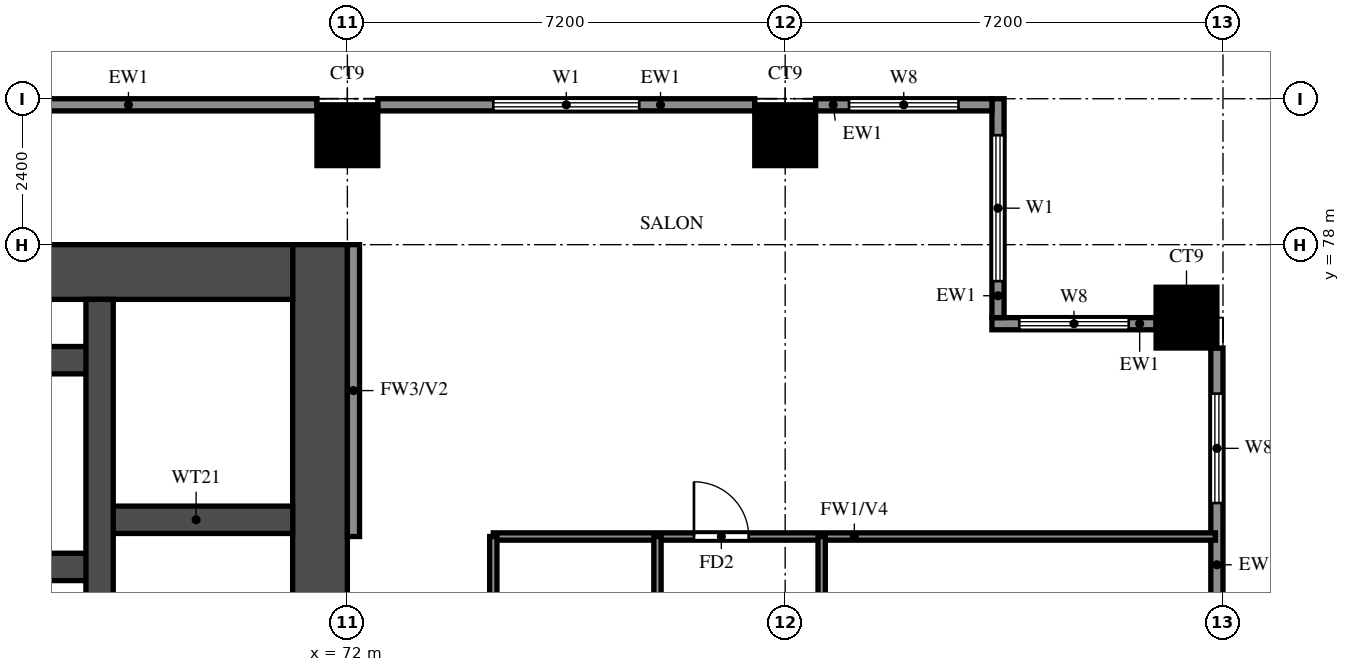
"""IFC4 building model, lengths in metres.
Left out: names, types, materials, properties, quantities, classifications, styles, units other than length and angle.
Written with IfcOpenShell. Run it as: python <this file> out.ifc"""

import sys

from ifc_helpers import new_model, si_unit, direction, frame, frame_2d, origin, origin_2d, place, context, subcontext, project, spatial, rectangle, extrude, source, transform, mapped, element, fill, save


model = new_model("IFC4")
c1 = context("Model", 3, precision=1e-05, world=origin(), true_north=direction((0.0, 1.0)))
c2 = subcontext(c1, "Body", "Model", "MODEL_VIEW")
j1 = project(units=[si_unit("LENGTHUNIT", "METRE"), si_unit("PLANEANGLEUNIT", "RADIAN")], contexts=[c1])
p1 = place(None, origin())
s1 = spatial("IfcSite", under=j1, at=p1, CompositionType="ELEMENT")
p2 = place(p1, origin())
s2 = spatial("IfcBuilding", under=s1, at=p2, CompositionType="ELEMENT")
p3 = place(p2, frame((0.0, 0.0, 83.0)))
s3 = spatial("IfcBuildingStorey", under=s2, at=p3, CompositionType="ELEMENT", Elevation=83.0)
m1 = source(origin(), c2, "Body", "SweptSolid", [
    extrude(rectangle(XDim=1.0, YDim=1.0, at=origin_2d()), origin(), (0.0, 0.0, 1.0), 3.18),
])
for number, where, z_axis, x_axis in (
    (1, (85.8, 76.8, 0.0), (0.0, 0.0, 1.0), (1.0, 0.0, 0.0)),
    (2, (72.0, 79.8, 0.0), (0.0, 0.0, 1.0), (1.0, 0.0, 0.0)),
    (3, (79.2, 79.8, 0.0), (0.0, 0.0, 1.0), (1.0, 0.0, 0.0)),
):
    element("IfcColumn", number, at=place(p3, frame(where, z_axis=z_axis, x_axis=x_axis)), inside=s3, PredefinedType="COLUMN", context=c2, shape_type="MappedRepresentation", body=[
        mapped(m1, transform((0.0, 0.0, 0.0))),
    ])
p4 = place(p3, frame((71.55, 66.0, 0.0), z_axis=(0.0, 0.0, 1.0), x_axis=(0.0, 1.0, 0.0)))
e4 = element("IfcWall", 4, at=p4, inside=s3, PredefinedType="SHEAR", context=c2, shape_type="SweptSolid", body=[
    extrude(rectangle(XDim=12.0, YDim=0.9, at=frame_2d((6.0, 0.0))), origin(), (0.0, 0.0, 1.0), 3.18),
])
p5 = place(p3, frame((29.7, 77.55, 0.0), z_axis=(0.0, 0.0, 1.0), x_axis=(1.0, 0.0, 0.0)))
e5 = element("IfcWall", 5, at=p5, inside=s3, PredefinedType="SHEAR", context=c2, shape_type="SweptSolid", body=[
    extrude(rectangle(XDim=41.4, YDim=0.9, at=frame_2d((20.7, 0.0))), origin(), (0.0, 0.0, 1.0), 3.18),
])
p6 = place(p3, frame((32.875, 72.7, 0.0), z_axis=(0.0, 0.0, 1.0), x_axis=(1.0, 0.0, 0.0)))
e6 = element("IfcWall", 6, at=p6, inside=s3, PredefinedType="SHEAR", context=c2, shape_type="SweptSolid", body=[
    extrude(rectangle(XDim=35.05, YDim=0.45, at=frame_2d((17.525, 0.0))), origin(), (0.0, 0.0, 1.0), 3.18),
])
p7 = place(p6, frame((19.8, 0.0, 0.0)))
e7 = element("IfcOpeningElement", 7, at=p7, cuts=e6, PredefinedType="OPENING", context=c2, shape_type="SweptSolid", body=[
    extrude(rectangle(XDim=1.1, YDim=2.1, at=frame_2d((0.55, 1.05))), frame((0.0, 0.235, 0.0), z_axis=(0.0, -1.0, 0.0), x_axis=(1.0, 0.0, 0.0)), (0.0, 0.0, 1.0), 0.47),
])
p8 = place(p6, frame((27.65, 0.0, 0.0)))
e8 = element("IfcOpeningElement", 8, at=p8, cuts=e6, PredefinedType="OPENING", context=c2, shape_type="SweptSolid", body=[
    extrude(rectangle(XDim=1.1, YDim=2.1, at=frame_2d((0.55, 1.05))), frame((0.0, 0.235, 0.0), z_axis=(0.0, -1.0, 0.0), x_axis=(1.0, 0.0, 0.0)), (0.0, 0.0, 1.0), 0.47),
])
p9 = place(p6, frame((30.25, 0.0, 0.0)))
e9 = element("IfcOpeningElement", 9, at=p9, cuts=e6, PredefinedType="OPENING", context=c2, shape_type="SweptSolid", body=[
    extrude(rectangle(XDim=1.1, YDim=2.1, at=frame_2d((0.55, 1.05))), frame((0.0, 0.235, 0.0), z_axis=(0.0, -1.0, 0.0), x_axis=(1.0, 0.0, 0.0)), (0.0, 0.0, 1.0), 0.47),
])
p10 = place(p6, frame((3.75, 0.0, 0.0)))
e10 = element("IfcOpeningElement", 10, at=p10, cuts=e6, PredefinedType="OPENING", context=c2, shape_type="SweptSolid", body=[
    extrude(rectangle(XDim=1.1, YDim=2.1, at=frame_2d((0.55, 1.05))), frame((0.0, 0.235, 0.0), z_axis=(0.0, -1.0, 0.0), x_axis=(1.0, 0.0, 0.0)), (0.0, 0.0, 1.0), 0.47),
])
p11 = place(p6, frame((6.5, 0.0, 0.0)))
e11 = element("IfcOpeningElement", 11, at=p11, cuts=e6, PredefinedType="OPENING", context=c2, shape_type="SweptSolid", body=[
    extrude(rectangle(XDim=1.1, YDim=2.1, at=frame_2d((0.55, 1.05))), frame((0.0, 0.235, 0.0), z_axis=(0.0, -1.0, 0.0), x_axis=(1.0, 0.0, 0.0)), (0.0, 0.0, 1.0), 0.47),
])
p12 = place(p6, frame((9.25, 0.0, 0.0)))
e12 = element("IfcOpeningElement", 12, at=p12, cuts=e6, PredefinedType="OPENING", context=c2, shape_type="SweptSolid", body=[
    extrude(rectangle(XDim=1.1, YDim=2.1, at=frame_2d((0.55, 1.05))), frame((0.0, 0.235, 0.0), z_axis=(0.0, -1.0, 0.0), x_axis=(1.0, 0.0, 0.0)), (0.0, 0.0, 1.0), 0.47),
])
p13 = place(p6, frame((12.0, 0.0, 0.0)))
e13 = element("IfcOpeningElement", 13, at=p13, cuts=e6, PredefinedType="OPENING", context=c2, shape_type="SweptSolid", body=[
    extrude(rectangle(XDim=1.1, YDim=2.1, at=frame_2d((0.55, 1.05))), frame((0.0, 0.235, 0.0), z_axis=(0.0, -1.0, 0.0), x_axis=(1.0, 0.0, 0.0)), (0.0, 0.0, 1.0), 0.47),
])
p14 = place(p6, frame((14.75, 0.0, 0.0)))
e14 = element("IfcOpeningElement", 14, at=p14, cuts=e6, PredefinedType="OPENING", context=c2, shape_type="SweptSolid", body=[
    extrude(rectangle(XDim=1.1, YDim=2.1, at=frame_2d((0.55, 1.05))), frame((0.0, 0.235, 0.0), z_axis=(0.0, -1.0, 0.0), x_axis=(1.0, 0.0, 0.0)), (0.0, 0.0, 1.0), 0.47),
])
p15 = place(p6, frame((17.5, 0.0, 0.0)))
e15 = element("IfcOpeningElement", 15, at=p15, cuts=e6, PredefinedType="OPENING", context=c2, shape_type="SweptSolid", body=[
    extrude(rectangle(XDim=1.1, YDim=2.1, at=frame_2d((0.55, 1.05))), frame((0.0, 0.235, 0.0), z_axis=(0.0, -1.0, 0.0), x_axis=(1.0, 0.0, 0.0)), (0.0, 0.0, 1.0), 0.47),
])
p16 = place(p6, frame((0.913, 0.0, 0.0)))
e16 = element("IfcOpeningElement", 16, at=p16, cuts=e6, PredefinedType="OPENING", context=c2, shape_type="SweptSolid", body=[
    extrude(rectangle(XDim=1.1, YDim=2.1, at=frame_2d((0.55, 1.05))), frame((0.0, 0.235, 0.0), z_axis=(0.0, -1.0, 0.0), x_axis=(1.0, 0.0, 0.0)), (0.0, 0.0, 1.0), 0.47),
])
p17 = place(p3, frame((32.875, 76.1, 0.0), z_axis=(0.0, 0.0, 1.0), x_axis=(1.0, 0.0, 0.0)))
e17 = element("IfcWall", 17, at=p17, inside=s3, PredefinedType="SHEAR", context=c2, shape_type="SweptSolid", body=[
    extrude(rectangle(XDim=35.05, YDim=0.45, at=frame_2d((17.525, 0.0))), origin(), (0.0, 0.0, 1.0), 3.18),
])
p18 = place(p3, frame((67.925, 73.475, 0.0), z_axis=(0.0, 0.0, 1.0), x_axis=(1.0, 0.0, 0.0)))
e18 = element("IfcWall", 18, at=p18, inside=s3, PredefinedType="SHEAR", context=c2, shape_type="SweptSolid", body=[
    extrude(rectangle(XDim=3.175, YDim=0.45, at=frame_2d((1.587, 0.0))), origin(), (0.0, 0.0, 1.0), 3.18),
])
p19 = place(p3, frame((67.925, 66.45, 0.0), z_axis=(0.0, 0.0, 1.0), x_axis=(0.0, 1.0, 0.0)))
e19 = element("IfcWall", 19, at=p19, inside=s3, PredefinedType="SHEAR", context=c2, shape_type="SweptSolid", body=[
    extrude(rectangle(XDim=10.65, YDim=0.45, at=frame_2d((5.325, 0.0))), origin(), (0.0, 0.0, 1.0), 3.18),
])
p20 = place(p19, frame((0.15, 0.0, 0.0)))
e20 = element("IfcOpeningElement", 20, at=p20, cuts=e19, PredefinedType="OPENING", context=c2, shape_type="SweptSolid", body=[
    extrude(rectangle(XDim=1.1, YDim=2.1, at=frame_2d((0.55, 1.05))), frame((0.0, 0.235, 0.0), z_axis=(0.0, -1.0, 0.0), x_axis=(1.0, 0.0, 0.0)), (0.0, 0.0, 1.0), 0.47),
])
p21 = place(p3, frame((86.3, 70.1, 0.0), z_axis=(0.0, 0.0, 1.0), x_axis=(0.0, 1.0, 0.0)))
e21 = element("IfcWall", 21, at=p21, inside=s3, PredefinedType="SOLIDWALL", context=c2, shape_type="SweptSolid", body=[
    extrude(rectangle(XDim=6.2, YDim=0.2, at=frame_2d((3.1, 0.0))), origin(), (0.0, 0.0, 1.0), 3.18),
])
p22 = place(p21, frame((1.2, 0.0, 1.5)))
e22 = element("IfcOpeningElement", 22, at=p22, cuts=e21, PredefinedType="OPENING", context=c2, shape_type="SweptSolid", body=[
    extrude(rectangle(XDim=0.9, YDim=0.9, at=frame_2d((0.45, 0.45))), frame((0.0, 0.11, 0.0), z_axis=(0.0, -1.0, 0.0), x_axis=(1.0, 0.0, 0.0)), (0.0, 0.0, 1.0), 0.22),
])
p23 = place(p21, frame((3.65, 0.0, 0.6)))
e23 = element("IfcOpeningElement", 23, at=p23, cuts=e21, PredefinedType="OPENING", context=c2, shape_type="SweptSolid", body=[
    extrude(rectangle(XDim=1.8, YDim=2.4, at=frame_2d((0.9, 1.2))), frame((0.0, 0.11, 0.0), z_axis=(0.0, -1.0, 0.0), x_axis=(1.0, 0.0, 0.0)), (0.0, 0.0, 1.0), 0.22),
])
p24 = place(p3, frame((85.3, 76.7, 0.0), z_axis=(0.0, 0.0, 1.0), x_axis=(-1.0, 0.0, 0.0)))
e24 = element("IfcWall", 24, at=p24, inside=s3, PredefinedType="SOLIDWALL", context=c2, shape_type="SweptSolid", body=[
    extrude(rectangle(XDim=2.7, YDim=0.2, at=frame_2d((1.35, 0.0))), origin(), (0.0, 0.0, 1.0), 3.18),
])
p25 = place(p24, frame((0.45, 0.0, 0.6)))
e25 = element("IfcOpeningElement", 25, at=p25, cuts=e24, PredefinedType="OPENING", context=c2, shape_type="SweptSolid", body=[
    extrude(rectangle(XDim=1.8, YDim=2.4, at=frame_2d((0.9, 1.2))), frame((0.0, 0.11, 0.0), z_axis=(0.0, -1.0, 0.0), x_axis=(1.0, 0.0, 0.0)), (0.0, 0.0, 1.0), 0.22),
])
p26 = place(p3, frame((82.7, 76.8, 0.0), z_axis=(0.0, 0.0, 1.0), x_axis=(0.0, 1.0, 0.0)))
e26 = element("IfcWall", 26, at=p26, inside=s3, PredefinedType="SOLIDWALL", context=c2, shape_type="SweptSolid", body=[
    extrude(rectangle(XDim=3.6, YDim=0.2, at=frame_2d((1.8, 0.0))), origin(), (0.0, 0.0, 1.0), 3.18),
])
p27 = place(p26, frame((0.6, 0.0, 0.6)))
e27 = element("IfcOpeningElement", 27, at=p27, cuts=e26, PredefinedType="OPENING", context=c2, shape_type="SweptSolid", body=[
    extrude(rectangle(XDim=2.4, YDim=2.4, at=frame_2d((1.2, 1.2))), frame((0.0, 0.11, 0.0), z_axis=(0.0, -1.0, 0.0), x_axis=(1.0, 0.0, 0.0)), (0.0, 0.0, 1.0), 0.22),
])
p28 = place(p3, frame((82.6, 80.3, 0.0), z_axis=(0.0, 0.0, 1.0), x_axis=(-1.0, 0.0, 0.0)))
e28 = element("IfcWall", 28, at=p28, inside=s3, PredefinedType="SOLIDWALL", context=c2, shape_type="SweptSolid", body=[
    extrude(rectangle(XDim=2.9, YDim=0.2, at=frame_2d((1.45, 0.0))), origin(), (0.0, 0.0, 1.0), 3.18),
])
p29 = place(p28, frame((0.55, 0.0, 0.6)))
e29 = element("IfcOpeningElement", 29, at=p29, cuts=e28, PredefinedType="OPENING", context=c2, shape_type="SweptSolid", body=[
    extrude(rectangle(XDim=1.8, YDim=2.4, at=frame_2d((0.9, 1.2))), frame((0.0, 0.11, 0.0), z_axis=(0.0, -1.0, 0.0), x_axis=(1.0, 0.0, 0.0)), (0.0, 0.0, 1.0), 0.22),
])
p30 = place(p3, frame((78.7, 80.3, 0.0), z_axis=(0.0, 0.0, 1.0), x_axis=(-1.0, 0.0, 0.0)))
e30 = element("IfcWall", 30, at=p30, inside=s3, PredefinedType="SOLIDWALL", context=c2, shape_type="SweptSolid", body=[
    extrude(rectangle(XDim=6.2, YDim=0.2, at=frame_2d((3.1, 0.0))), origin(), (0.0, 0.0, 1.0), 3.18),
])
p31 = place(p30, frame((1.9, 0.0, 0.6)))
e31 = element("IfcOpeningElement", 31, at=p31, cuts=e30, PredefinedType="OPENING", context=c2, shape_type="SweptSolid", body=[
    extrude(rectangle(XDim=2.4, YDim=2.4, at=frame_2d((1.2, 1.2))), frame((0.0, 0.11, 0.0), z_axis=(0.0, -1.0, 0.0), x_axis=(1.0, 0.0, 0.0)), (0.0, 0.0, 1.0), 0.22),
])
p32 = place(p3, frame((71.5, 80.3, 0.0), z_axis=(0.0, 0.0, 1.0), x_axis=(-1.0, 0.0, 0.0)))
e32 = element("IfcWall", 32, at=p32, inside=s3, PredefinedType="SOLIDWALL", context=c2, shape_type="SweptSolid", body=[
    extrude(rectangle(XDim=6.2, YDim=0.2, at=frame_2d((3.1, 0.0))), origin(), (0.0, 0.0, 1.0), 3.18),
])
p33 = place(p3, frame((72.1, 73.2, 0.0), z_axis=(0.0, 0.0, 1.0), x_axis=(0.0, 1.0, 0.0)))
e33 = element("IfcWall", 33, at=p33, inside=s3, PredefinedType="SOLIDWALL", context=c2, shape_type="SweptSolid", body=[
    extrude(rectangle(XDim=4.8, YDim=0.2, at=frame_2d((2.4, 0.0))), origin(), (0.0, 0.0, 1.0), 3.18),
])
p34 = place(p3, frame((74.4, 73.2, 0.0), z_axis=(0.0, 0.0, 1.0), x_axis=(1.0, 0.0, 0.0)))
e34 = element("IfcWall", 34, at=p34, inside=s3, PredefinedType="PARTITIONING", context=c2, shape_type="SweptSolid", body=[
    extrude(rectangle(XDim=11.875, YDim=0.12, at=frame_2d((5.938, 0.0))), origin(), (0.0, 0.0, 1.0), 2.28),
])
p35 = place(p34, frame((3.3, 0.0, 0.0)))
e35 = element("IfcOpeningElement", 35, at=p35, cuts=e34, PredefinedType="OPENING", context=c2, shape_type="SweptSolid", body=[
    extrude(rectangle(XDim=0.9, YDim=2.1, at=frame_2d((0.45, 1.05))), frame((0.0, 0.07, 0.0), z_axis=(0.0, -1.0, 0.0), x_axis=(1.0, 0.0, 0.0)), (0.0, 0.0, 1.0), 0.14),
])
p36 = place(p3, frame((74.4, 68.6, 0.0), z_axis=(0.0, 0.0, 1.0), x_axis=(0.0, 1.0, 0.0)))
e36 = element("IfcWall", 36, at=p36, inside=s3, PredefinedType="PARTITIONING", context=c2, shape_type="SweptSolid", body=[
    extrude(rectangle(XDim=4.6, YDim=0.12, at=frame_2d((2.3, 0.0))), origin(), (0.0, 0.0, 1.0), 3.18),
])
p37 = place(p3, frame((77.1, 61.2, 0.0), z_axis=(0.0, 0.0, 1.0), x_axis=(0.0, 1.0, 0.0)))
e37 = element("IfcWall", 37, at=p37, inside=s3, PredefinedType="PARTITIONING", context=c2, shape_type="SweptSolid", body=[
    extrude(rectangle(XDim=12.0, YDim=0.12, at=frame_2d((6.0, 0.0))), origin(), (0.0, 0.0, 1.0), 3.18),
])
p38 = place(p37, frame((4.55, 0.0, 0.0)))
e38 = element("IfcOpeningElement", 38, at=p38, cuts=e37, PredefinedType="OPENING", context=c2, shape_type="SweptSolid", body=[
    extrude(rectangle(XDim=0.9, YDim=2.1, at=frame_2d((0.45, 1.05))), frame((0.0, 0.07, 0.0), z_axis=(0.0, -1.0, 0.0), x_axis=(1.0, 0.0, 0.0)), (0.0, 0.0, 1.0), 0.14),
])
p39 = place(p37, frame((9.3, 0.0, 0.0)))
e39 = element("IfcOpeningElement", 39, at=p39, cuts=e37, PredefinedType="OPENING", context=c2, shape_type="SweptSolid", body=[
    extrude(rectangle(XDim=0.8, YDim=2.1, at=frame_2d((0.4, 1.05))), frame((0.0, 0.07, 0.0), z_axis=(0.0, -1.0, 0.0), x_axis=(1.0, 0.0, 0.0)), (0.0, 0.0, 1.0), 0.14),
])
p40 = place(p3, frame((79.8, 69.6, 0.0), z_axis=(0.0, 0.0, 1.0), x_axis=(0.0, 1.0, 0.0)))
e40 = element("IfcWall", 40, at=p40, inside=s3, PredefinedType="PARTITIONING", context=c2, shape_type="SweptSolid", body=[
    extrude(rectangle(XDim=3.6, YDim=0.12, at=frame_2d((1.8, 0.0))), origin(), (0.0, 0.0, 1.0), 3.18),
])
p41 = place(p23, origin())
e41 = element("IfcWindow", 41, at=p41, inside=s3, PartitioningType="DOUBLE_PANEL_VERTICAL", PredefinedType="WINDOW", context=c2, shape_type="SweptSolid", body=[
    extrude(rectangle(XDim=1.8, YDim=2.4, at=frame_2d((0.9, 1.2))), frame((0.0, 0.03, 0.0), z_axis=(0.0, -1.0, 0.0), x_axis=(1.0, 0.0, 0.0)), (0.0, 0.0, 1.0), 0.06),
])
fill(e23, e41)
p42 = place(p25, origin())
e42 = element("IfcWindow", 42, at=p42, inside=s3, PartitioningType="DOUBLE_PANEL_VERTICAL", PredefinedType="WINDOW", context=c2, shape_type="SweptSolid", body=[
    extrude(rectangle(XDim=1.8, YDim=2.4, at=frame_2d((0.9, 1.2))), frame((0.0, 0.03, 0.0), z_axis=(0.0, -1.0, 0.0), x_axis=(1.0, 0.0, 0.0)), (0.0, 0.0, 1.0), 0.06),
])
fill(e25, e42)
p43 = place(p27, origin())
e43 = element("IfcWindow", 43, at=p43, inside=s3, PartitioningType="DOUBLE_PANEL_VERTICAL", PredefinedType="WINDOW", context=c2, shape_type="SweptSolid", body=[
    extrude(rectangle(XDim=2.4, YDim=2.4, at=frame_2d((1.2, 1.2))), frame((0.0, 0.03, 0.0), z_axis=(0.0, -1.0, 0.0), x_axis=(1.0, 0.0, 0.0)), (0.0, 0.0, 1.0), 0.06),
])
fill(e27, e43)
p44 = place(p29, origin())
e44 = element("IfcWindow", 44, at=p44, inside=s3, PartitioningType="DOUBLE_PANEL_VERTICAL", PredefinedType="WINDOW", context=c2, shape_type="SweptSolid", body=[
    extrude(rectangle(XDim=1.8, YDim=2.4, at=frame_2d((0.9, 1.2))), frame((0.0, 0.03, 0.0), z_axis=(0.0, -1.0, 0.0), x_axis=(1.0, 0.0, 0.0)), (0.0, 0.0, 1.0), 0.06),
])
fill(e29, e44)
p45 = place(p31, origin())
e45 = element("IfcWindow", 45, at=p45, inside=s3, PartitioningType="DOUBLE_PANEL_VERTICAL", PredefinedType="WINDOW", context=c2, shape_type="SweptSolid", body=[
    extrude(rectangle(XDim=2.4, YDim=2.4, at=frame_2d((1.2, 1.2))), frame((0.0, 0.03, 0.0), z_axis=(0.0, -1.0, 0.0), x_axis=(1.0, 0.0, 0.0)), (0.0, 0.0, 1.0), 0.06),
])
fill(e31, e45)
p46 = place(p35, origin())
e46 = element("IfcDoor", 46, at=p46, inside=s3, OperationType="SINGLE_SWING_LEFT", PredefinedType="DOOR", context=c2, shape_type="SweptSolid", body=[
    extrude(rectangle(XDim=0.9, YDim=2.1, at=frame_2d((0.45, 1.05))), frame((0.0, 0.025, 0.0), z_axis=(0.0, -1.0, 0.0), x_axis=(1.0, 0.0, 0.0)), (0.0, 0.0, 1.0), 0.05),
])
fill(e35, e46)
save(model, sys.argv[1])
